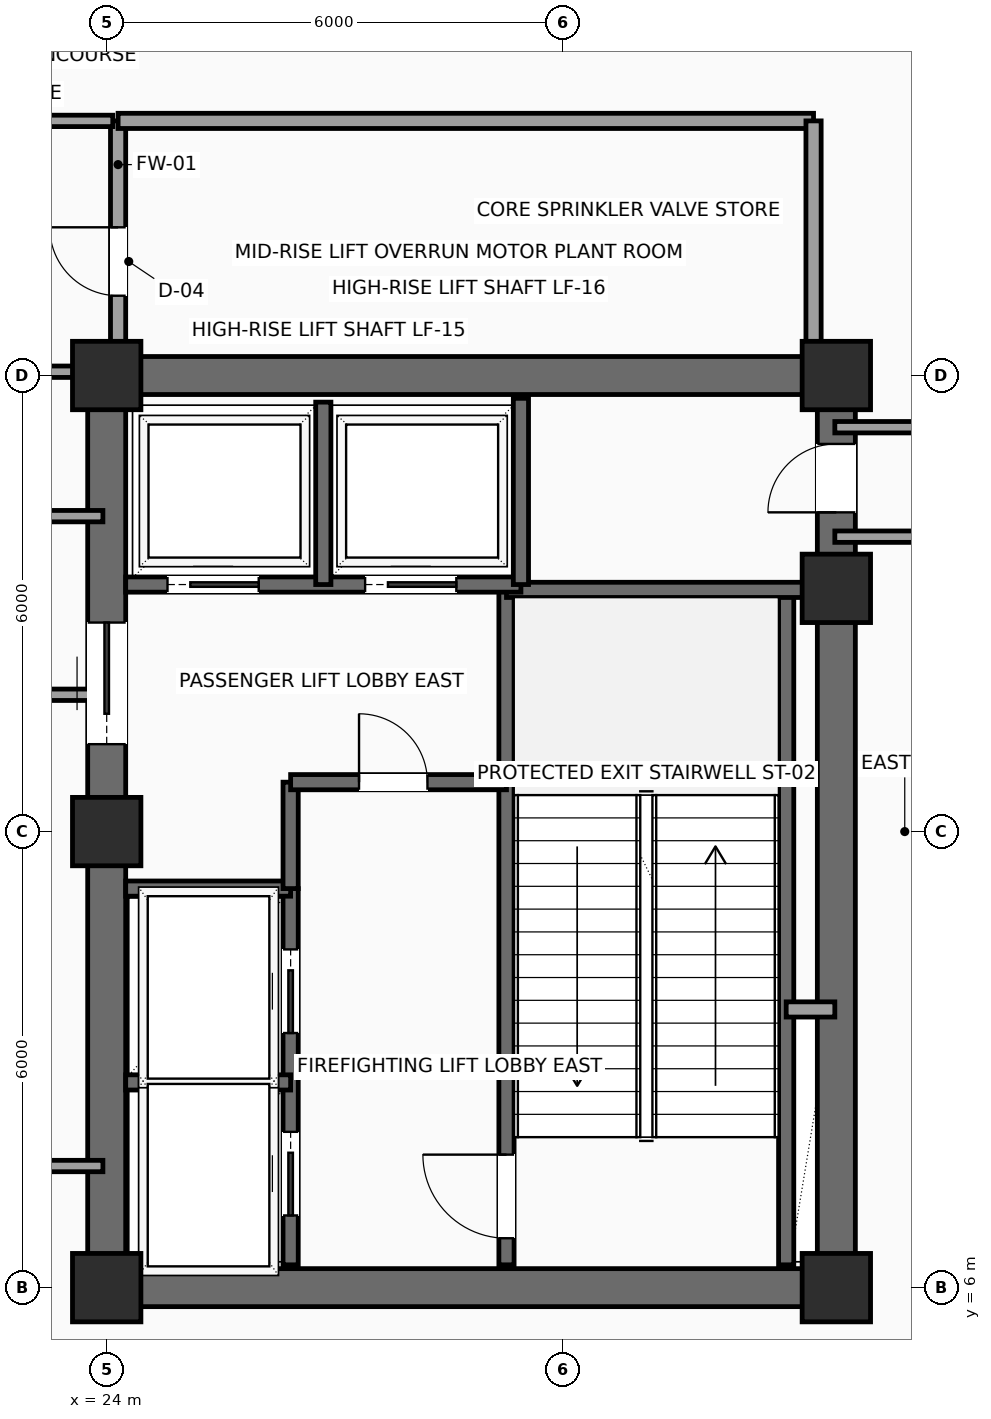
"""IFC4 building model, lengths in metres.
Left out: names, types, materials, properties, quantities, classifications, styles, units other than length and angle.
Written with IfcOpenShell. Run it as: python <this file> out.ifc"""

import sys

from ifc_helpers import new_model, si_unit, direction, frame, frame_2d, origin, origin_2d, place, context, subcontext, project, spatial, rectangle, extrude, element, fill, save


model = new_model("IFC4")
c1 = context("Model", 3, precision=1e-05, world=origin(), true_north=direction((0.0, 1.0)))
c2 = subcontext(c1, "Body", "Model", "MODEL_VIEW")
j1 = project(units=[si_unit("LENGTHUNIT", "METRE"), si_unit("PLANEANGLEUNIT", "RADIAN")], contexts=[c1])
p1 = place(None, origin())
s1 = spatial("IfcSite", under=j1, at=p1, CompositionType="ELEMENT")
p2 = place(p1, origin())
s2 = spatial("IfcBuilding", under=s1, at=p2, CompositionType="ELEMENT")
p3 = place(p2, frame((0.0, 0.0, 204.0)))
s3 = spatial("IfcBuildingStorey", under=s2, at=p3, CompositionType="ELEMENT", Elevation=204.0)
for number, where, z_axis, x_axis in (
    (1, (24.0, 6.0, 0.0), (0.0, 0.0, 1.0), (1.0, 0.0, 0.0)),
    (2, (24.0, 12.0, 0.0), (0.0, 0.0, 1.0), (1.0, 0.0, 0.0)),
    (3, (24.0, 18.0, 0.0), (0.0, 0.0, 1.0), (1.0, 0.0, 0.0)),
    (4, (33.6, 6.0, 0.0), (0.0, 0.0, 1.0), (1.0, 0.0, 0.0)),
    (5, (33.6, 15.2, 0.0), (0.0, 0.0, 1.0), (1.0, 0.0, 0.0)),
    (6, (33.6, 18.0, 0.0), (0.0, 0.0, 1.0), (1.0, 0.0, 0.0)),
):
    element("IfcColumn", number, at=place(p3, frame(where, z_axis=z_axis, x_axis=x_axis)), inside=s3, PredefinedType="COLUMN", context=c2, shape_type="SweptSolid", body=[
        extrude(rectangle(XDim=0.9, YDim=0.9, at=origin_2d()), origin(), (0.0, 0.0, 1.0), 4.65),
    ])
for number, where, z_axis, x_axis in (
    (7, (24.0, 6.0, 0.0), (0.0, 0.0, 1.0), (1.0, 0.0, 0.0)),
    (8, (24.0, 18.0, 0.0), (0.0, 0.0, 1.0), (1.0, 0.0, 0.0)),
):
    element("IfcWall", number, at=place(p3, frame(where, z_axis=z_axis, x_axis=x_axis)), inside=s3, PredefinedType="SHEAR", context=c2, shape_type="SweptSolid", body=[
        extrude(rectangle(XDim=9.6, YDim=0.5, at=frame_2d((4.8, 0.0))), origin(), (0.0, 0.0, 1.0), 4.44),
    ])
p4 = place(p3, frame((24.0, 6.0, 0.0), z_axis=(0.0, 0.0, 1.0), x_axis=(0.0, 1.0, 0.0)))
e9 = element("IfcWall", 9, at=p4, inside=s3, PredefinedType="SHEAR", context=c2, shape_type="SweptSolid", body=[
    extrude(rectangle(XDim=12.0, YDim=0.5, at=frame_2d((6.0, 0.0))), origin(), (0.0, 0.0, 1.0), 4.44),
])
p5 = place(p4, frame((7.15, 0.0, 0.0)))
e10 = element("IfcOpeningElement", 10, at=p5, cuts=e9, PredefinedType="OPENING", context=c2, shape_type="SweptSolid", body=[
    extrude(rectangle(XDim=1.6, YDim=2.3, at=frame_2d((0.8, 1.15))), frame((0.0, 0.26, 0.0), z_axis=(0.0, -1.0, 0.0), x_axis=(1.0, 0.0, 0.0)), (0.0, 0.0, 1.0), 0.52),
])
p6 = place(p3, frame((33.6, 6.0, 0.0), z_axis=(0.0, 0.0, 1.0), x_axis=(0.0, 1.0, 0.0)))
e11 = element("IfcWall", 11, at=p6, inside=s3, PredefinedType="SHEAR", context=c2, shape_type="SweptSolid", body=[
    extrude(rectangle(XDim=12.0, YDim=0.5, at=frame_2d((6.0, 0.0))), origin(), (0.0, 0.0, 1.0), 4.44),
])
p7 = place(p6, frame((10.2, 0.0, 0.0)))
e12 = element("IfcOpeningElement", 12, at=p7, cuts=e11, PredefinedType="OPENING", context=c2, shape_type="SweptSolid", body=[
    extrude(rectangle(XDim=0.9, YDim=2.15, at=frame_2d((0.45, 1.075))), frame((0.0, 0.26, 0.0), z_axis=(0.0, -1.0, 0.0), x_axis=(1.0, 0.0, 0.0)), (0.0, 0.0, 1.0), 0.52),
])
p8 = place(p3, frame((29.26, 6.3, 0.0), z_axis=(0.0, 0.0, 1.0), x_axis=(0.0, 1.0, 0.0)))
e13 = element("IfcWall", 13, at=p8, inside=s3, PredefinedType="SHEAR", context=c2, shape_type="SweptSolid", body=[
    extrude(rectangle(XDim=8.88, YDim=0.2, at=frame_2d((4.44, 0.0))), origin(), (0.0, 0.0, 1.0), 4.44),
])
p9 = place(p8, frame((0.35, 0.0, 0.0)))
e14 = element("IfcOpeningElement", 14, at=p9, cuts=e13, PredefinedType="OPENING", context=c2, shape_type="SweptSolid", body=[
    extrude(rectangle(XDim=1.1, YDim=2.2, at=frame_2d((0.55, 1.1))), frame((0.0, 0.11, 0.0), z_axis=(0.0, -1.0, 0.0), x_axis=(1.0, 0.0, 0.0)), (0.0, 0.0, 1.0), 0.22),
])
p10 = place(p3, frame((32.94, 6.3, 0.0), z_axis=(0.0, 0.0, 1.0), x_axis=(0.0, 1.0, 0.0)))
e15 = element("IfcWall", 15, at=p10, inside=s3, PredefinedType="SHEAR", context=c2, shape_type="SweptSolid", body=[
    extrude(rectangle(XDim=8.88, YDim=0.2, at=frame_2d((4.44, 0.0))), origin(), (0.0, 0.0, 1.0), 4.44),
])
p11 = place(p3, frame((29.26, 15.18, 0.0), z_axis=(0.0, 0.0, 1.0), x_axis=(1.0, 0.0, 0.0)))
e16 = element("IfcWall", 16, at=p11, inside=s3, PredefinedType="SHEAR", context=c2, shape_type="SweptSolid", body=[
    extrude(rectangle(XDim=4.04, YDim=0.2, at=frame_2d((2.02, 0.0))), origin(), (0.0, 0.0, 1.0), 4.44),
])
p12 = place(p3, frame((26.42, 6.3, 0.0), z_axis=(0.0, 0.0, 1.0), x_axis=(0.0, 1.0, 0.0)))
e17 = element("IfcWall", 17, at=p12, inside=s3, PredefinedType="SHEAR", context=c2, shape_type="SweptSolid", body=[
    extrude(rectangle(XDim=4.95, YDim=0.2, at=frame_2d((2.475, 0.0))), origin(), (0.0, 0.0, 1.0), 4.44),
])
p13 = place(p12, frame((0.65, 0.0, 0.0)))
e18 = element("IfcOpeningElement", 18, at=p13, cuts=e17, PredefinedType="OPENING", context=c2, shape_type="SweptSolid", body=[
    extrude(rectangle(XDim=1.1, YDim=2.2, at=frame_2d((0.55, 1.1))), frame((0.0, 0.11, 0.0), z_axis=(0.0, -1.0, 0.0), x_axis=(1.0, 0.0, 0.0)), (0.0, 0.0, 1.0), 0.22),
])
p14 = place(p12, frame((3.05, 0.0, 0.0)))
e19 = element("IfcOpeningElement", 19, at=p14, cuts=e17, PredefinedType="OPENING", context=c2, shape_type="SweptSolid", body=[
    extrude(rectangle(XDim=1.1, YDim=2.2, at=frame_2d((0.55, 1.1))), frame((0.0, 0.11, 0.0), z_axis=(0.0, -1.0, 0.0), x_axis=(1.0, 0.0, 0.0)), (0.0, 0.0, 1.0), 0.22),
])
for number, where, z_axis, x_axis in (
    (20, (24.25, 8.7, 0.0), (0.0, 0.0, 1.0), (1.0, 0.0, 0.0)),
    (21, (24.25, 11.25, 0.0), (0.0, 0.0, 1.0), (1.0, 0.0, 0.0)),
):
    element("IfcWall", number, at=place(p3, frame(where, z_axis=z_axis, x_axis=x_axis)), inside=s3, PredefinedType="SHEAR", context=c2, shape_type="SweptSolid", body=[
        extrude(rectangle(XDim=2.17, YDim=0.2, at=frame_2d((1.085, 0.0))), origin(), (0.0, 0.0, 1.0), 4.44),
    ])
p15 = place(p3, frame((26.42, 11.25, 0.0), z_axis=(0.0, 0.0, 1.0), x_axis=(0.0, 1.0, 0.0)))
e22 = element("IfcWall", 22, at=p15, inside=s3, PredefinedType="SHEAR", context=c2, shape_type="SweptSolid", body=[
    extrude(rectangle(XDim=1.4, YDim=0.2, at=frame_2d((0.7, 0.0))), origin(), (0.0, 0.0, 1.0), 4.44),
])
p16 = place(p3, frame((26.42, 12.65, 0.0), z_axis=(0.0, 0.0, 1.0), x_axis=(1.0, 0.0, 0.0)))
e23 = element("IfcWall", 23, at=p16, inside=s3, PredefinedType="SHEAR", context=c2, shape_type="SweptSolid", body=[
    extrude(rectangle(XDim=2.84, YDim=0.2, at=frame_2d((1.42, 0.0))), origin(), (0.0, 0.0, 1.0), 4.44),
])
p17 = place(p16, frame((0.9, 0.0, 0.0)))
e24 = element("IfcOpeningElement", 24, at=p17, cuts=e23, PredefinedType="OPENING", context=c2, shape_type="SweptSolid", body=[
    extrude(rectangle(XDim=0.9, YDim=2.15, at=frame_2d((0.45, 1.075))), frame((0.0, 0.11, 0.0), z_axis=(0.0, -1.0, 0.0), x_axis=(1.0, 0.0, 0.0)), (0.0, 0.0, 1.0), 0.22),
])
p18 = place(p3, frame((32.94, 9.66, 0.0), z_axis=(0.0, 0.0, 1.0), x_axis=(1.0, 0.0, 0.0)))
e25 = element("IfcWall", 25, at=p18, inside=s3, PredefinedType="SOLIDWALL", context=c2, shape_type="SweptSolid", body=[
    extrude(rectangle(XDim=0.64, YDim=0.2, at=frame_2d((0.32, 0.0))), origin(), (0.0, 0.0, 1.0), 4.44),
])
p19 = place(p3, frame((24.25, 15.25, 0.0), z_axis=(0.0, 0.0, 1.0), x_axis=(1.0, 0.0, 0.0)))
e26 = element("IfcWall", 26, at=p19, inside=s3, PredefinedType="SHEAR", context=c2, shape_type="SweptSolid", body=[
    extrude(rectangle(XDim=5.2, YDim=0.2, at=frame_2d((2.6, 0.0))), origin(), (0.0, 0.0, 1.0), 4.44),
])
p20 = place(p19, frame((0.55, 0.0, 0.0)))
e27 = element("IfcOpeningElement", 27, at=p20, cuts=e26, PredefinedType="OPENING", context=c2, shape_type="SweptSolid", body=[
    extrude(rectangle(XDim=1.2, YDim=2.2, at=frame_2d((0.6, 1.1))), frame((0.0, 0.11, 0.0), z_axis=(0.0, -1.0, 0.0), x_axis=(1.0, 0.0, 0.0)), (0.0, 0.0, 1.0), 0.22),
])
p21 = place(p19, frame((3.15, 0.0, 0.0)))
e28 = element("IfcOpeningElement", 28, at=p21, cuts=e26, PredefinedType="OPENING", context=c2, shape_type="SweptSolid", body=[
    extrude(rectangle(XDim=1.2, YDim=2.2, at=frame_2d((0.6, 1.1))), frame((0.0, 0.11, 0.0), z_axis=(0.0, -1.0, 0.0), x_axis=(1.0, 0.0, 0.0)), (0.0, 0.0, 1.0), 0.22),
])
p22 = place(p3, frame((26.85, 15.25, 0.0), z_axis=(0.0, 0.0, 1.0), x_axis=(0.0, 1.0, 0.0)))
e29 = element("IfcWall", 29, at=p22, inside=s3, PredefinedType="SHEAR", context=c2, shape_type="SweptSolid", body=[
    extrude(rectangle(XDim=2.4, YDim=0.2, at=frame_2d((1.2, 0.0))), origin(), (0.0, 0.0, 1.0), 4.44),
])
p23 = place(p3, frame((29.45, 15.25, 0.0), z_axis=(0.0, 0.0, 1.0), x_axis=(0.0, 1.0, 0.0)))
e30 = element("IfcWall", 30, at=p23, inside=s3, PredefinedType="SHEAR", context=c2, shape_type="SweptSolid", body=[
    extrude(rectangle(XDim=2.45, YDim=0.2, at=frame_2d((1.225, 0.0))), origin(), (0.0, 0.0, 1.0), 4.44),
])
p24 = place(p3, frame((24.15, 18.1, 0.0), z_axis=(0.0, 0.0, 1.0), x_axis=(0.0, 1.0, 0.0)))
e31 = element("IfcWall", 31, at=p24, inside=s3, PredefinedType="SOLIDWALL", context=c2, shape_type="SweptSolid", body=[
    extrude(rectangle(XDim=3.25, YDim=0.2, at=frame_2d((1.625, 0.0))), origin(), (0.0, 0.0, 1.0), 4.44),
])
p25 = place(p24, frame((0.95, 0.0, 0.0)))
e32 = element("IfcOpeningElement", 32, at=p25, cuts=e31, PredefinedType="OPENING", context=c2, shape_type="SweptSolid", body=[
    extrude(rectangle(XDim=0.9, YDim=2.15, at=frame_2d((0.45, 1.075))), frame((0.0, 0.11, 0.0), z_axis=(0.0, -1.0, 0.0), x_axis=(1.0, 0.0, 0.0)), (0.0, 0.0, 1.0), 0.22),
])
p26 = place(p3, frame((24.15, 21.35, 0.0), z_axis=(0.0, 0.0, 1.0), x_axis=(1.0, 0.0, 0.0)))
e33 = element("IfcWall", 33, at=p26, inside=s3, PredefinedType="SOLIDWALL", context=c2, shape_type="SweptSolid", body=[
    extrude(rectangle(XDim=9.15, YDim=0.2, at=frame_2d((4.575, 0.0))), origin(), (0.0, 0.0, 1.0), 4.44),
])
p27 = place(p3, frame((33.3, 18.1, 0.0), z_axis=(0.0, 0.0, 1.0), x_axis=(0.0, 1.0, 0.0)))
e34 = element("IfcWall", 34, at=p27, inside=s3, PredefinedType="SOLIDWALL", context=c2, shape_type="SweptSolid", body=[
    extrude(rectangle(XDim=3.25, YDim=0.2, at=frame_2d((1.625, 0.0))), origin(), (0.0, 0.0, 1.0), 4.44),
])
for number, where, z_axis, x_axis in (
    (35, (36.15, 15.88, 0.0), (0.0, 0.0, 1.0), (-1.0, 0.0, 0.0)),
    (36, (33.58, 17.32, 0.0), (0.0, 0.0, 1.0), (1.0, 0.0, 0.0)),
):
    element("IfcWall", number, at=place(p3, frame(where, z_axis=z_axis, x_axis=x_axis)), inside=s3, PredefinedType="PARTITIONING", context=c2, shape_type="SweptSolid", body=[
        extrude(rectangle(XDim=2.57, YDim=0.15, at=frame_2d((1.285, 0.0))), origin(), (0.0, 0.0, 1.0), 4.44),
    ])
p28 = place(p3, frame((20.45, 21.35, 0.0), z_axis=(0.0, 0.0, 1.0), x_axis=(1.0, 0.0, 0.0)))
e37 = element("IfcWall", 37, at=p28, inside=s3, PredefinedType="PARTITIONING", context=c2, shape_type="SweptSolid", body=[
    extrude(rectangle(XDim=3.63, YDim=0.15, at=frame_2d((1.815, 0.0))), origin(), (0.0, 0.0, 1.0), 4.44),
])
p29 = place(p3, frame((24.0, 18.05, 0.0), z_axis=(0.0, 0.0, 1.0), x_axis=(-1.0, 0.0, 0.0)))
e38 = element("IfcWall", 38, at=p29, inside=s3, PredefinedType="PARTITIONING", context=c2, shape_type="SweptSolid", body=[
    extrude(rectangle(XDim=3.55, YDim=0.15, at=frame_2d((1.775, 0.0))), origin(), (0.0, 0.0, 1.0), 4.032),
])
p30 = place(p3, frame((20.45, 16.15, 0.0), z_axis=(0.0, 0.0, 1.0), x_axis=(1.0, 0.0, 0.0)))
e39 = element("IfcWall", 39, at=p30, inside=s3, PredefinedType="PARTITIONING", context=c2, shape_type="SweptSolid", body=[
    extrude(rectangle(XDim=3.5, YDim=0.15, at=frame_2d((1.75, 0.0))), origin(), (0.0, 0.0, 1.0), 4.44),
])
for number, where, z_axis, x_axis in (
    (40, (23.95, 13.8, 0.0), (0.0, 0.0, 1.0), (-1.0, 0.0, 0.0)),
    (41, (14.95, 7.6, 0.0), (0.0, 0.0, 1.0), (1.0, 0.0, 0.0)),
):
    element("IfcWall", number, at=place(p3, frame(where, z_axis=z_axis, x_axis=x_axis)), inside=s3, PredefinedType="PARTITIONING", context=c2, shape_type="SweptSolid", body=[
        extrude(rectangle(XDim=9.0, YDim=0.15, at=frame_2d((4.5, 0.0))), origin(), (0.0, 0.0, 1.0), 4.44),
    ])
p31 = place(p5, origin())
e42 = element("IfcDoor", 42, at=p31, inside=s3, OperationType="DOUBLE_DOOR_SLIDING", PredefinedType="DOOR", context=c2, shape_type="SweptSolid", body=[
    extrude(rectangle(XDim=1.6, YDim=2.3, at=frame_2d((0.8, 1.15))), frame((0.0, 0.025, 0.0), z_axis=(0.0, -1.0, 0.0), x_axis=(1.0, 0.0, 0.0)), (0.0, 0.0, 1.0), 0.05),
])
fill(e10, e42)
p32 = place(p7, origin())
e43 = element("IfcDoor", 43, at=p32, inside=s3, OperationType="SINGLE_SWING_LEFT", PredefinedType="DOOR", context=c2, shape_type="SweptSolid", body=[
    extrude(rectangle(XDim=0.9, YDim=2.15, at=frame_2d((0.45, 1.075))), frame((0.0, 0.025, 0.0), z_axis=(0.0, -1.0, 0.0), x_axis=(1.0, 0.0, 0.0)), (0.0, 0.0, 1.0), 0.05),
])
fill(e12, e43)
p33 = place(p9, origin())
e44 = element("IfcDoor", 44, at=p33, inside=s3, OperationType="SINGLE_SWING_RIGHT", PredefinedType="DOOR", context=c2, shape_type="SweptSolid", body=[
    extrude(rectangle(XDim=1.1, YDim=2.2, at=frame_2d((0.55, 1.1))), frame((0.0, 0.025, 0.0), z_axis=(0.0, -1.0, 0.0), x_axis=(1.0, 0.0, 0.0)), (0.0, 0.0, 1.0), 0.05),
])
fill(e14, e44)
p34 = place(p13, origin())
e45 = element("IfcDoor", 45, at=p34, inside=s3, OperationType="SLIDING_TO_LEFT", PredefinedType="DOOR", context=c2, shape_type="SweptSolid", body=[
    extrude(rectangle(XDim=1.1, YDim=2.2, at=frame_2d((0.55, 1.1))), frame((0.0, 0.025, 0.0), z_axis=(0.0, -1.0, 0.0), x_axis=(1.0, 0.0, 0.0)), (0.0, 0.0, 1.0), 0.05),
])
fill(e18, e45)
p35 = place(p14, origin())
e46 = element("IfcDoor", 46, at=p35, inside=s3, OperationType="SLIDING_TO_LEFT", PredefinedType="DOOR", context=c2, shape_type="SweptSolid", body=[
    extrude(rectangle(XDim=1.1, YDim=2.2, at=frame_2d((0.55, 1.1))), frame((0.0, 0.025, 0.0), z_axis=(0.0, -1.0, 0.0), x_axis=(1.0, 0.0, 0.0)), (0.0, 0.0, 1.0), 0.05),
])
fill(e19, e46)
p36 = place(p17, origin())
e47 = element("IfcDoor", 47, at=p36, inside=s3, OperationType="SINGLE_SWING_LEFT", PredefinedType="DOOR", context=c2, shape_type="SweptSolid", body=[
    extrude(rectangle(XDim=0.9, YDim=2.15, at=frame_2d((0.45, 1.075))), frame((0.0, 0.025, 0.0), z_axis=(0.0, -1.0, 0.0), x_axis=(1.0, 0.0, 0.0)), (0.0, 0.0, 1.0), 0.05),
])
fill(e24, e47)
p37 = place(p20, origin())
e48 = element("IfcDoor", 48, at=p37, inside=s3, OperationType="SLIDING_TO_RIGHT", PredefinedType="DOOR", context=c2, shape_type="SweptSolid", body=[
    extrude(rectangle(XDim=1.2, YDim=2.2, at=frame_2d((0.6, 1.1))), frame((0.0, 0.025, 0.0), z_axis=(0.0, -1.0, 0.0), x_axis=(1.0, 0.0, 0.0)), (0.0, 0.0, 1.0), 0.05),
])
fill(e27, e48)
p38 = place(p21, origin())
e49 = element("IfcDoor", 49, at=p38, inside=s3, OperationType="SLIDING_TO_RIGHT", PredefinedType="DOOR", context=c2, shape_type="SweptSolid", body=[
    extrude(rectangle(XDim=1.2, YDim=2.2, at=frame_2d((0.6, 1.1))), frame((0.0, 0.025, 0.0), z_axis=(0.0, -1.0, 0.0), x_axis=(1.0, 0.0, 0.0)), (0.0, 0.0, 1.0), 0.05),
])
fill(e28, e49)
p39 = place(p25, origin())
e50 = element("IfcDoor", 50, at=p39, inside=s3, OperationType="SINGLE_SWING_RIGHT", PredefinedType="DOOR", context=c2, shape_type="SweptSolid", body=[
    extrude(rectangle(XDim=0.9, YDim=2.15, at=frame_2d((0.45, 1.075))), frame((0.0, 0.025, 0.0), z_axis=(0.0, -1.0, 0.0), x_axis=(1.0, 0.0, 0.0)), (0.0, 0.0, 1.0), 0.05),
])
fill(e32, e50)
save(model, sys.argv[1])
